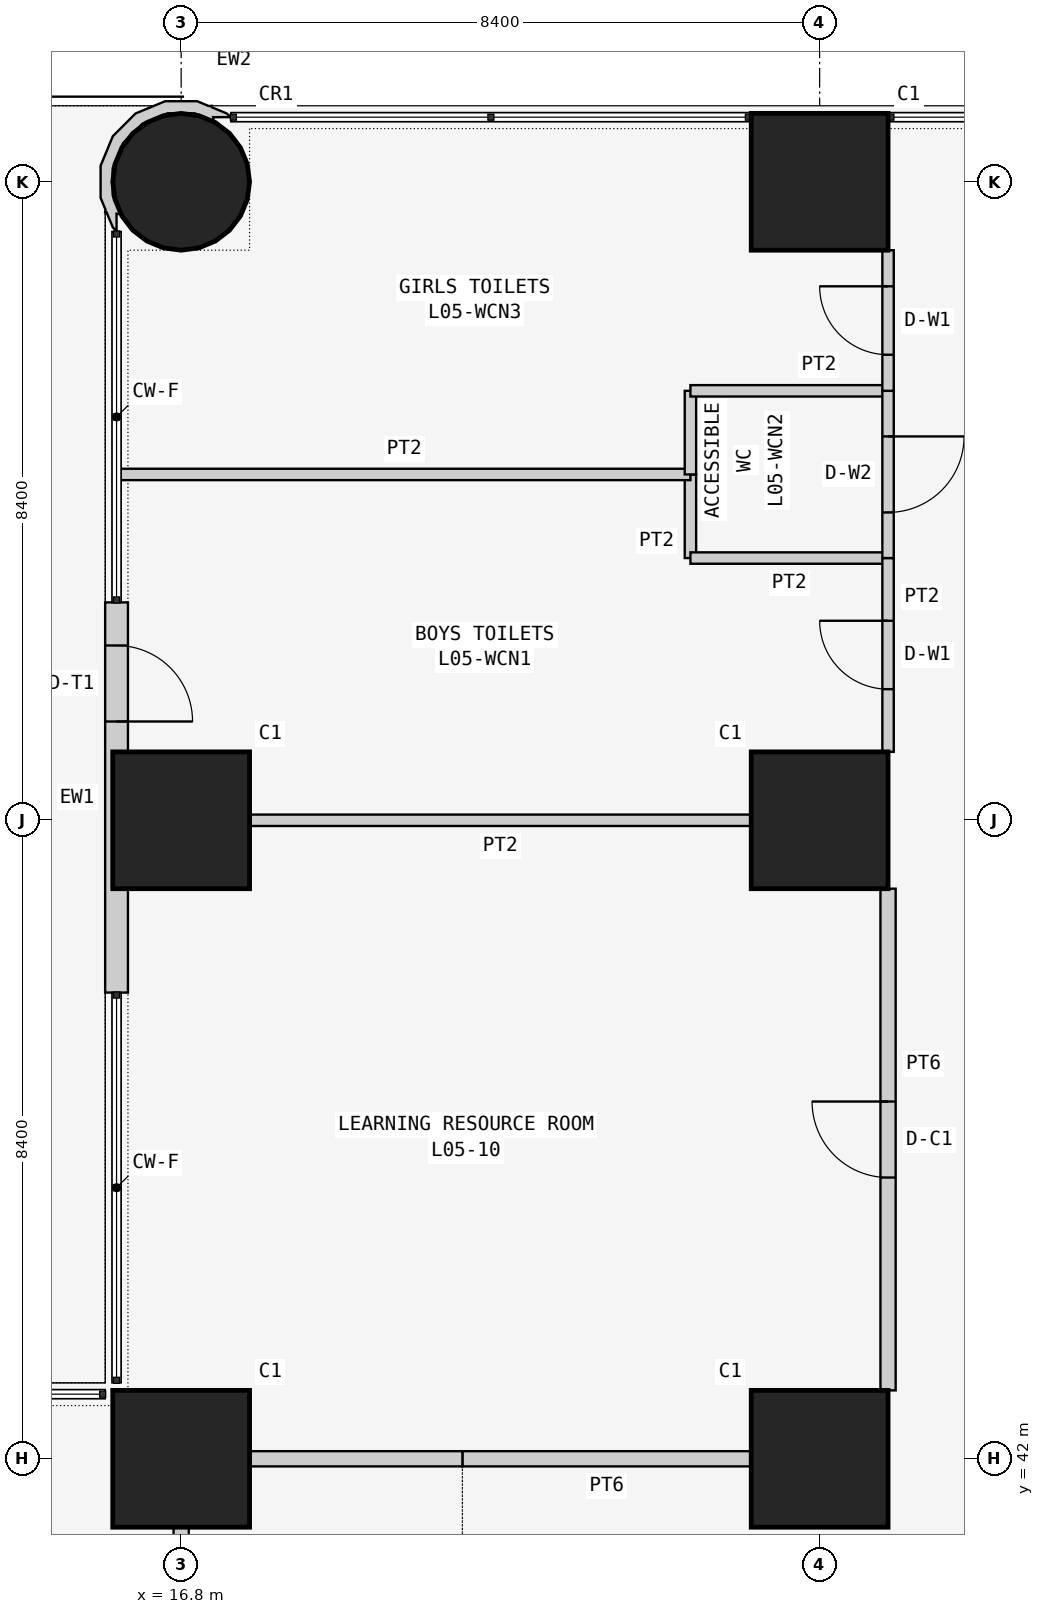
"""IFC4 building model, lengths in metres.
Left out: names, types, materials, properties, quantities, classifications, styles, units other than length and angle.
Written with IfcOpenShell. Run it as: python <this file> out.ifc"""

import sys

from ifc_helpers import new_model, si_unit, direction, frame, frame_2d, origin, origin_2d, place, context, subcontext, project, spatial, polyline, rectangle, circle, outline, extrude, element, fill, save


model = new_model("IFC4")
c1 = context("Model", 3, precision=1e-05, world=origin(), true_north=direction((0.0, 1.0)))
c2 = subcontext(c1, "Body", "Model", "MODEL_VIEW")
j1 = project(units=[si_unit("LENGTHUNIT", "METRE"), si_unit("PLANEANGLEUNIT", "RADIAN")], contexts=[c1])
p1 = place(None, origin())
s1 = spatial("IfcSite", under=j1, at=p1, CompositionType="ELEMENT")
p2 = place(p1, origin())
s2 = spatial("IfcBuilding", under=s1, at=p2, CompositionType="ELEMENT")
p3 = place(p2, frame((0.0, 0.0, 24.0)))
s3 = spatial("IfcBuildingStorey", under=s2, at=p3, CompositionType="ELEMENT", Elevation=24.0)
for number, where, z_axis, x_axis in (
    (1, (16.8, 42.0, 0.0), (0.0, 0.0, 1.0), (1.0, 0.0, 0.0)),
    (2, (16.8, 50.4, 0.0), (0.0, 0.0, 1.0), (1.0, 0.0, 0.0)),
):
    element("IfcColumn", number, at=place(p3, frame(where, z_axis=z_axis, x_axis=x_axis)), inside=s3, PredefinedType="COLUMN", context=c2, shape_type="SweptSolid", body=[
        extrude(rectangle(XDim=1.8, YDim=1.8, at=origin_2d()), origin(), (0.0, 0.0, 1.0), 4.5),
    ])
p4 = place(p3, frame((16.8, 58.8, 0.0), z_axis=(0.0, 0.0, 1.0), x_axis=(1.0, 0.0, 0.0)))
e3 = element("IfcColumn", 3, at=p4, inside=s3, PredefinedType="COLUMN", context=c2, shape_type="SweptSolid", body=[
    extrude(circle(Radius=0.9, at=origin_2d()), origin(), (0.0, 0.0, 1.0), 4.5),
])
for number, where, z_axis, x_axis in (
    (4, (25.2, 42.0, 0.0), (0.0, 0.0, 1.0), (1.0, 0.0, 0.0)),
    (5, (25.2, 50.4, 0.0), (0.0, 0.0, 1.0), (1.0, 0.0, 0.0)),
    (6, (25.2, 58.8, 0.0), (0.0, 0.0, 1.0), (1.0, 0.0, 0.0)),
):
    element("IfcColumn", number, at=place(p3, frame(where, z_axis=z_axis, x_axis=x_axis)), inside=s3, PredefinedType="COLUMN", context=c2, shape_type="SweptSolid", body=[
        extrude(rectangle(XDim=1.8, YDim=1.8, at=origin_2d()), origin(), (0.0, 0.0, 1.0), 4.5),
    ])
p5 = place(p3, frame((15.95, 53.267, 0.0), z_axis=(0.0, 0.0, 1.0), x_axis=(0.0, -1.0, 0.0)))
e7 = element("IfcWall", 7, at=p5, inside=s3, PredefinedType="SOLIDWALL", context=c2, shape_type="SweptSolid", body=[
    extrude(rectangle(XDim=5.133, YDim=0.3, at=frame_2d((2.567, 0.0))), origin(), (0.0, 0.0, 1.0), 4.25),
])
p6 = place(p5, frame((0.567, 0.0, 0.0)))
e8 = element("IfcOpeningElement", 8, at=p6, cuts=e7, PredefinedType="OPENING", context=c2, shape_type="SweptSolid", body=[
    extrude(rectangle(XDim=1.0, YDim=2.4, at=frame_2d((0.5, 1.2))), frame((0.0, 0.16, 0.0), z_axis=(0.0, -1.0, 0.0), x_axis=(1.0, 0.0, 0.0)), (0.0, 0.0, 1.0), 0.32),
])
p7 = place(p3, frame((17.395, 59.579, 0.0), z_axis=(0.0, 0.0, 1.0), x_axis=(-0.707106781187, 0.707106781187, 0.0)))
e9 = element("IfcWall", 9, at=p7, inside=s3, PredefinedType="SOLIDWALL", context=c2, shape_type="SweptSolid", body=[
    extrude(outline(polyline([(0.012, -0.089), (0.081, -0.089), (0.278, -0.007), (0.294, -0.019), (0.315, 0.008), (0.47, 0.073), (0.769, 0.371), (0.93, 0.76), (0.93, 1.182), (0.768, 1.572), (0.47, 1.87), (0.315, 1.934), (0.294, 1.961), (0.279, 1.949), (0.081, 2.031), (0.012, 2.031), (0.174, 1.869), (0.133, 1.838), (0.38, 1.735), (0.634, 1.482), (0.771, 1.151), (0.771, 0.792), (0.634, 0.461), (0.38, 0.208), (0.133, 0.105), (0.174, 0.074), (0.012, -0.089)])), origin(), (0.0, 0.0, 1.0), 4.25),
])
p8 = place(p3, frame((23.5, 54.95, 0.0), z_axis=(0.0, 0.0, 1.0), x_axis=(0.0, -1.0, 0.0)))
e10 = element("IfcWall", 10, at=p8, inside=s3, PredefinedType="PARTITIONING", context=c2, shape_type="SweptSolid", body=[
    extrude(rectangle(XDim=1.1, YDim=0.15, at=frame_2d((0.55, 0.0))), origin(), (0.0, 0.0, 1.0), 4.25),
])
p9 = place(p3, frame((23.5, 53.85, 0.0), z_axis=(0.0, 0.0, 1.0), x_axis=(1.0, 0.0, 0.0)))
e11 = element("IfcWall", 11, at=p9, inside=s3, PredefinedType="PARTITIONING", context=c2, shape_type="SweptSolid", body=[
    extrude(rectangle(XDim=2.6, YDim=0.15, at=frame_2d((1.3, 0.0))), origin(), (0.0, 0.0, 1.0), 4.25),
])
p10 = place(p3, frame((15.974, 54.95, 0.0), z_axis=(0.0, 0.0, 1.0), x_axis=(1.0, 0.0, 0.0)))
e12 = element("IfcWall", 12, at=p10, inside=s3, PredefinedType="PARTITIONING", context=c2, shape_type="SweptSolid", body=[
    extrude(rectangle(XDim=7.526, YDim=0.15, at=frame_2d((3.763, 0.0))), origin(), (0.0, 0.0, 1.0), 4.25),
])
p11 = place(p3, frame((24.3, 50.4, 0.0), z_axis=(0.0, 0.0, 1.0), x_axis=(-1.0, 0.0, 0.0)))
e13 = element("IfcWall", 13, at=p11, inside=s3, PredefinedType="PARTITIONING", context=c2, shape_type="SweptSolid", body=[
    extrude(rectangle(XDim=6.6, YDim=0.15, at=frame_2d((3.3, 0.0))), origin(), (0.0, 0.0, 1.0), 3.409),
])
p12 = place(p3, frame((26.1, 53.85, 0.0), z_axis=(0.0, 0.0, 1.0), x_axis=(0.0, -1.0, 0.0)))
e14 = element("IfcWall", 14, at=p12, inside=s3, PredefinedType="PARTITIONING", context=c2, shape_type="SweptSolid", body=[
    extrude(rectangle(XDim=2.55, YDim=0.15, at=frame_2d((1.275, 0.0))), origin(), (0.0, 0.0, 1.0), 4.25),
])
p13 = place(p12, frame((0.825, 0.0, 0.0)))
e15 = element("IfcOpeningElement", 15, at=p13, cuts=e14, PredefinedType="OPENING", context=c2, shape_type="SweptSolid", body=[
    extrude(rectangle(XDim=0.9, YDim=2.1, at=frame_2d((0.45, 1.05))), frame((0.0, 0.085, 0.0), z_axis=(0.0, -1.0, 0.0), x_axis=(1.0, 0.0, 0.0)), (0.0, 0.0, 1.0), 0.17),
])
p14 = place(p3, frame((23.5, 54.95, 0.0), z_axis=(0.0, 0.0, 1.0), x_axis=(0.0, 1.0, 0.0)))
e16 = element("IfcWall", 16, at=p14, inside=s3, PredefinedType="PARTITIONING", context=c2, shape_type="SweptSolid", body=[
    extrude(rectangle(XDim=1.1, YDim=0.15, at=frame_2d((0.55, 0.0))), origin(), (0.0, 0.0, 1.0), 4.25),
])
p15 = place(p3, frame((23.5, 56.05, 0.0), z_axis=(0.0, 0.0, 1.0), x_axis=(1.0, 0.0, 0.0)))
e17 = element("IfcWall", 17, at=p15, inside=s3, PredefinedType="PARTITIONING", context=c2, shape_type="SweptSolid", body=[
    extrude(rectangle(XDim=2.6, YDim=0.15, at=frame_2d((1.3, 0.0))), origin(), (0.0, 0.0, 1.0), 4.25),
])
p16 = place(p3, frame((26.1, 56.05, 0.0), z_axis=(0.0, 0.0, 1.0), x_axis=(0.0, -1.0, 0.0)))
e18 = element("IfcWall", 18, at=p16, inside=s3, PredefinedType="PARTITIONING", context=c2, shape_type="SweptSolid", body=[
    extrude(rectangle(XDim=2.2, YDim=0.15, at=frame_2d((1.1, 0.0))), origin(), (0.0, 0.0, 1.0), 4.25),
])
p17 = place(p16, frame((0.6, 0.0, 0.0)))
e19 = element("IfcOpeningElement", 19, at=p17, cuts=e18, PredefinedType="OPENING", context=c2, shape_type="SweptSolid", body=[
    extrude(rectangle(XDim=1.0, YDim=2.1, at=frame_2d((0.5, 1.05))), frame((0.0, 0.085, 0.0), z_axis=(0.0, -1.0, 0.0), x_axis=(1.0, 0.0, 0.0)), (0.0, 0.0, 1.0), 0.17),
])
p18 = place(p3, frame((26.1, 57.9, 0.0), z_axis=(0.0, 0.0, 1.0), x_axis=(0.0, -1.0, 0.0)))
e20 = element("IfcWall", 20, at=p18, inside=s3, PredefinedType="PARTITIONING", context=c2, shape_type="SweptSolid", body=[
    extrude(rectangle(XDim=1.85, YDim=0.15, at=frame_2d((0.925, 0.0))), origin(), (0.0, 0.0, 1.0), 4.25),
])
p19 = place(p18, frame((0.475, 0.0, 0.0)))
e21 = element("IfcOpeningElement", 21, at=p19, cuts=e20, PredefinedType="OPENING", context=c2, shape_type="SweptSolid", body=[
    extrude(rectangle(XDim=0.9, YDim=2.1, at=frame_2d((0.45, 1.05))), frame((0.0, 0.085, 0.0), z_axis=(0.0, -1.0, 0.0), x_axis=(1.0, 0.0, 0.0)), (0.0, 0.0, 1.0), 0.17),
])
p20 = place(p3, frame((16.8, 41.1, 0.0), z_axis=(0.0, 0.0, 1.0), x_axis=(0.0, -1.0, 0.0)))
e22 = element("IfcWall", 22, at=p20, inside=s3, PredefinedType="PARTITIONING", context=c2, shape_type="SweptSolid", body=[
    extrude(rectangle(XDim=6.6, YDim=0.2, at=frame_2d((3.3, 0.0))), origin(), (0.0, 0.0, 1.0), 3.409),
])
p21 = place(p20, frame((2.8, 0.0, 0.0)))
e23 = element("IfcOpeningElement", 23, at=p21, cuts=e22, PredefinedType="OPENING", context=c2, shape_type="SweptSolid", body=[
    extrude(rectangle(XDim=1.0, YDim=2.1, at=frame_2d((0.5, 1.05))), frame((0.0, 0.11, 0.0), z_axis=(0.0, -1.0, 0.0), x_axis=(1.0, 0.0, 0.0)), (0.0, 0.0, 1.0), 0.22),
])
p22 = place(p3, frame((24.3, 42.0, 0.0), z_axis=(0.0, 0.0, 1.0), x_axis=(-1.0, 0.0, 0.0)))
e24 = element("IfcWall", 24, at=p22, inside=s3, PredefinedType="PARTITIONING", context=c2, shape_type="SweptSolid", body=[
    extrude(rectangle(XDim=3.8, YDim=0.2, at=frame_2d((1.9, 0.0))), origin(), (0.0, 0.0, 1.0), 3.409),
])
p23 = place(p3, frame((26.1, 49.5, 0.0), z_axis=(0.0, 0.0, 1.0), x_axis=(0.0, -1.0, 0.0)))
e25 = element("IfcWall", 25, at=p23, inside=s3, PredefinedType="PARTITIONING", context=c2, shape_type="SweptSolid", body=[
    extrude(rectangle(XDim=6.6, YDim=0.2, at=frame_2d((3.3, 0.0))), origin(), (0.0, 0.0, 1.0), 4.25),
])
p24 = place(p23, frame((2.8, 0.0, 0.0)))
e26 = element("IfcOpeningElement", 26, at=p24, cuts=e25, PredefinedType="OPENING", context=c2, shape_type="SweptSolid", body=[
    extrude(rectangle(XDim=1.0, YDim=2.1, at=frame_2d((0.5, 1.05))), frame((0.0, 0.11, 0.0), z_axis=(0.0, -1.0, 0.0), x_axis=(1.0, 0.0, 0.0)), (0.0, 0.0, 1.0), 0.22),
])
p25 = place(p3, frame((20.5, 42.0, 0.0), z_axis=(0.0, 0.0, 1.0), x_axis=(-1.0, 0.0, 0.0)))
e27 = element("IfcWall", 27, at=p25, inside=s3, PredefinedType="PARTITIONING", context=c2, shape_type="SweptSolid", body=[
    extrude(rectangle(XDim=2.8, YDim=0.2, at=frame_2d((1.4, 0.0))), origin(), (0.0, 0.0, 1.0), 3.409),
])
p26 = place(p6, origin())
e28 = element("IfcDoor", 28, at=p26, inside=s3, OperationType="SINGLE_SWING_RIGHT", PredefinedType="DOOR", context=c2, shape_type="SweptSolid", body=[
    extrude(rectangle(XDim=1.0, YDim=2.4, at=frame_2d((0.5, 1.2))), frame((0.0, 0.025, 0.0), z_axis=(0.0, -1.0, 0.0), x_axis=(1.0, 0.0, 0.0)), (0.0, 0.0, 1.0), 0.05),
])
fill(e8, e28)
p27 = place(p13, frame((0.9, 0.0, 0.0), z_axis=(0.0, 0.0, 1.0), x_axis=(-1.0, 0.0, 0.0)))
e29 = element("IfcDoor", 29, at=p27, inside=s3, OperationType="SINGLE_SWING_RIGHT", PredefinedType="DOOR", context=c2, shape_type="SweptSolid", body=[
    extrude(rectangle(XDim=0.9, YDim=2.1, at=frame_2d((0.45, 1.05))), frame((0.0, 0.025, 0.0), z_axis=(0.0, -1.0, 0.0), x_axis=(1.0, 0.0, 0.0)), (0.0, 0.0, 1.0), 0.05),
])
fill(e15, e29)
p28 = place(p17, origin())
e30 = element("IfcDoor", 30, at=p28, inside=s3, OperationType="SINGLE_SWING_LEFT", PredefinedType="DOOR", context=c2, shape_type="SweptSolid", body=[
    extrude(rectangle(XDim=1.0, YDim=2.1, at=frame_2d((0.5, 1.05))), frame((0.0, 0.025, 0.0), z_axis=(0.0, -1.0, 0.0), x_axis=(1.0, 0.0, 0.0)), (0.0, 0.0, 1.0), 0.05),
])
fill(e19, e30)
p29 = place(p19, frame((0.9, 0.0, 0.0), z_axis=(0.0, 0.0, 1.0), x_axis=(-1.0, 0.0, 0.0)))
e31 = element("IfcDoor", 31, at=p29, inside=s3, OperationType="SINGLE_SWING_RIGHT", PredefinedType="DOOR", context=c2, shape_type="SweptSolid", body=[
    extrude(rectangle(XDim=0.9, YDim=2.1, at=frame_2d((0.45, 1.05))), frame((0.0, 0.025, 0.0), z_axis=(0.0, -1.0, 0.0), x_axis=(1.0, 0.0, 0.0)), (0.0, 0.0, 1.0), 0.05),
])
fill(e21, e31)
p30 = place(p24, frame((1.0, 0.0, 0.0), z_axis=(0.0, 0.0, 1.0), x_axis=(-1.0, 0.0, 0.0)))
e32 = element("IfcDoor", 32, at=p30, inside=s3, OperationType="SINGLE_SWING_RIGHT", PredefinedType="DOOR", context=c2, shape_type="SweptSolid", body=[
    extrude(rectangle(XDim=1.0, YDim=2.1, at=frame_2d((0.5, 1.05))), frame((0.0, 0.025, 0.0), z_axis=(0.0, -1.0, 0.0), x_axis=(1.0, 0.0, 0.0)), (0.0, 0.0, 1.0), 0.05),
])
fill(e26, e32)
save(model, sys.argv[1])
